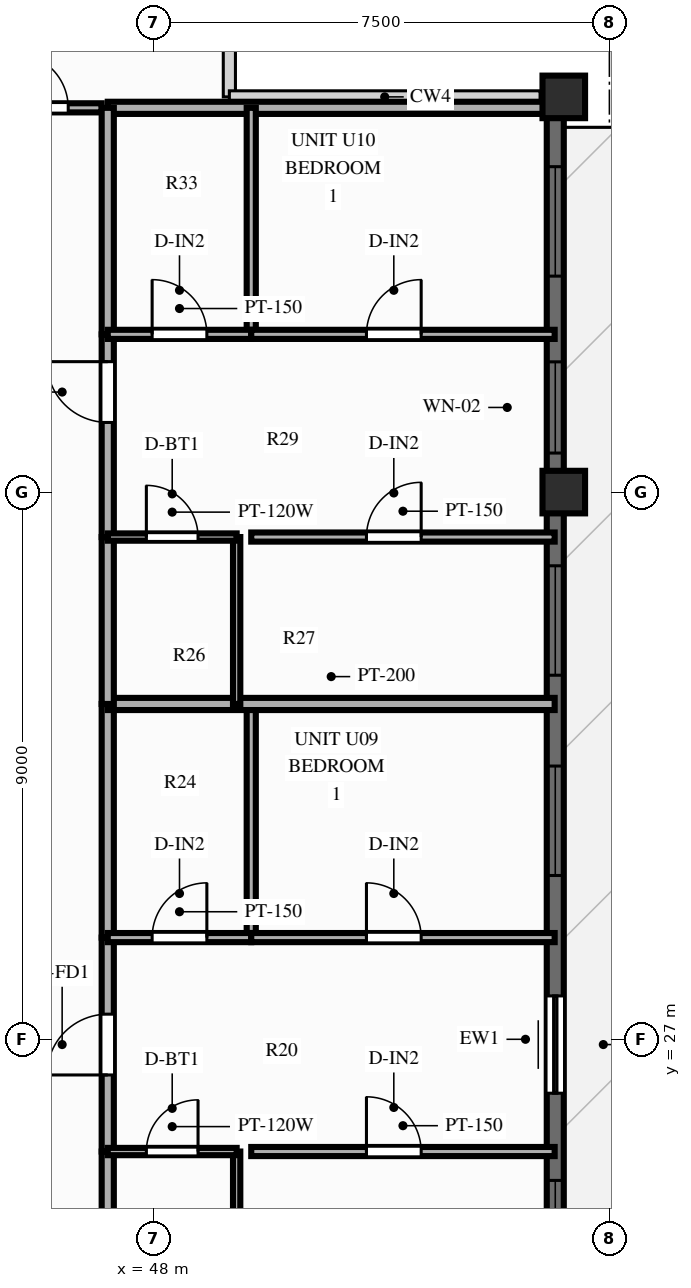
"""IFC4 building model, lengths in metres.
Left out: names, types, materials, properties, quantities, classifications, styles, units other than length and angle.
Written with IfcOpenShell. Run it as: python <this file> out.ifc"""

import sys

from ifc_helpers import new_model, si_unit, direction, frame, frame_2d, origin, origin_2d, place, context, subcontext, project, spatial, rectangle, extrude, source, transform, mapped, element, fill, save


model = new_model("IFC4")
c1 = context("Model", 3, precision=1e-05, world=origin(), true_north=direction((0.0, 1.0)))
c2 = subcontext(c1, "Body", "Model", "MODEL_VIEW")
j1 = project(units=[si_unit("LENGTHUNIT", "METRE"), si_unit("PLANEANGLEUNIT", "RADIAN")], contexts=[c1])
p1 = place(None, origin())
s1 = spatial("IfcSite", under=j1, at=p1, CompositionType="ELEMENT")
p2 = place(p1, origin())
s2 = spatial("IfcBuilding", under=s1, at=p2, CompositionType="ELEMENT")
p3 = place(p2, frame((0.0, 0.0, 226.2)))
s3 = spatial("IfcBuildingStorey", under=s2, at=p3, CompositionType="ELEMENT", Elevation=226.2)
m1 = source(origin(), c2, "Body", "SweptSolid", [
    extrude(rectangle(XDim=0.7, YDim=0.7, at=origin_2d()), origin(), (0.0, 0.0, 1.0), 3.9),
])
for number, where, z_axis, x_axis in (
    (1, (54.75, 36.0, 0.0), (0.0, 0.0, 1.0), (1.0, 0.0, 0.0)),
    (2, (54.75, 42.5, 0.0), (0.0, 0.0, 1.0), (1.0, 0.0, 0.0)),
):
    element("IfcColumn", number, at=place(p3, frame(where, z_axis=z_axis, x_axis=x_axis)), inside=s3, PredefinedType="COLUMN", context=c2, shape_type="MappedRepresentation", body=[
        mapped(m1, transform((0.0, 0.0, 0.0), scale=1.0)),
    ])
p4 = place(p3, frame((54.61, 11.5, 0.0), z_axis=(0.0, 0.0, 1.0), x_axis=(0.0, 1.0, 0.0)))
e3 = element("IfcWall", 3, at=p4, inside=s3, PredefinedType="SOLIDWALL", context=c2, shape_type="SweptSolid", body=[
    extrude(rectangle(XDim=31.0, YDim=0.28, at=frame_2d((15.5, 0.0))), origin(), (0.0, 0.0, 1.0), 2.79),
])
p5 = place(p4, frame((0.66, 0.0, 0.85)))
e4 = element("IfcOpeningElement", 4, at=p5, cuts=e3, PredefinedType="OPENING", context=c2, shape_type="SweptSolid", body=[
    extrude(rectangle(XDim=1.8, YDim=1.65, at=frame_2d((0.9, 0.825))), frame((0.0, 0.152, 0.0), z_axis=(0.0, -1.0, 0.0), x_axis=(1.0, 0.0, 0.0)), (0.0, 0.0, 1.0), 0.304),
])
p6 = place(p4, frame((3.72, 0.0, 0.85)))
e5 = element("IfcOpeningElement", 5, at=p6, cuts=e3, PredefinedType="OPENING", context=c2, shape_type="SweptSolid", body=[
    extrude(rectangle(XDim=1.8, YDim=1.65, at=frame_2d((0.9, 0.825))), frame((0.0, 0.152, 0.0), z_axis=(0.0, -1.0, 0.0), x_axis=(1.0, 0.0, 0.0)), (0.0, 0.0, 1.0), 0.304),
])
p7 = place(p4, frame((7.942, 0.0, 0.85)))
e6 = element("IfcOpeningElement", 6, at=p7, cuts=e3, PredefinedType="OPENING", context=c2, shape_type="SweptSolid", body=[
    extrude(rectangle(XDim=1.8, YDim=1.65, at=frame_2d((0.9, 0.825))), frame((0.0, 0.152, 0.0), z_axis=(0.0, -1.0, 0.0), x_axis=(1.0, 0.0, 0.0)), (0.0, 0.0, 1.0), 0.304),
])
p8 = place(p4, frame((11.379, 0.0, 0.85)))
e7 = element("IfcOpeningElement", 7, at=p8, cuts=e3, PredefinedType="OPENING", context=c2, shape_type="SweptSolid", body=[
    extrude(rectangle(XDim=1.8, YDim=1.65, at=frame_2d((0.9, 0.825))), frame((0.0, 0.152, 0.0), z_axis=(0.0, -1.0, 0.0), x_axis=(1.0, 0.0, 0.0)), (0.0, 0.0, 1.0), 0.304),
])
p9 = place(p4, frame((16.213, 0.0, 0.0), z_axis=(0.0, 0.0, 1.0), x_axis=(-1.0, 0.0, 0.0)))
e8 = element("IfcOpeningElement", 8, at=p9, cuts=e3, PredefinedType="OPENING", context=c2, shape_type="SweptSolid", body=[
    extrude(rectangle(XDim=1.6, YDim=2.15, at=frame_2d((0.8, 1.075))), frame((0.0, 0.152, 0.0), z_axis=(0.0, -1.0, 0.0), x_axis=(1.0, 0.0, 0.0)), (0.0, 0.0, 1.0), 0.304),
])
p10 = place(p4, frame((18.194, 0.0, 0.85)))
e9 = element("IfcOpeningElement", 9, at=p10, cuts=e3, PredefinedType="OPENING", context=c2, shape_type="SweptSolid", body=[
    extrude(rectangle(XDim=1.8, YDim=1.65, at=frame_2d((0.9, 0.825))), frame((0.0, 0.152, 0.0), z_axis=(0.0, -1.0, 0.0), x_axis=(1.0, 0.0, 0.0)), (0.0, 0.0, 1.0), 0.304),
])
p11 = place(p4, frame((21.488, 0.0, 0.85)))
e10 = element("IfcOpeningElement", 10, at=p11, cuts=e3, PredefinedType="OPENING", context=c2, shape_type="SweptSolid", body=[
    extrude(rectangle(XDim=1.8, YDim=1.65, at=frame_2d((0.9, 0.825))), frame((0.0, 0.152, 0.0), z_axis=(0.0, -1.0, 0.0), x_axis=(1.0, 0.0, 0.0)), (0.0, 0.0, 1.0), 0.304),
])
p12 = place(p4, frame((25.142, 0.0, 0.85)))
e11 = element("IfcOpeningElement", 11, at=p12, cuts=e3, PredefinedType="OPENING", context=c2, shape_type="SweptSolid", body=[
    extrude(rectangle(XDim=1.5, YDim=1.65, at=frame_2d((0.75, 0.825))), frame((0.0, 0.152, 0.0), z_axis=(0.0, -1.0, 0.0), x_axis=(1.0, 0.0, 0.0)), (0.0, 0.0, 1.0), 0.304),
])
p13 = place(p4, frame((28.052, 0.0, 0.85)))
e12 = element("IfcOpeningElement", 12, at=p13, cuts=e3, PredefinedType="OPENING", context=c2, shape_type="SweptSolid", body=[
    extrude(rectangle(XDim=1.8, YDim=1.65, at=frame_2d((0.9, 0.825))), frame((0.0, 0.152, 0.0), z_axis=(0.0, -1.0, 0.0), x_axis=(1.0, 0.0, 0.0)), (0.0, 0.0, 1.0), 0.304),
])
p14 = place(p3, frame((44.82, 42.32, 0.0), z_axis=(0.0, 0.0, 1.0), x_axis=(1.0, 0.0, 0.0)))
e13 = element("IfcWall", 13, at=p14, inside=s3, PredefinedType="PARTITIONING", context=c2, shape_type="SweptSolid", body=[
    extrude(rectangle(XDim=2.33, YDim=0.15, at=frame_2d((1.165, 0.0))), origin(), (0.0, 0.0, 1.0), 3.69),
])
p15 = place(p14, frame((0.88, 0.0, 0.0)))
e14 = element("IfcOpeningElement", 14, at=p15, cuts=e13, PredefinedType="OPENING", context=c2, shape_type="SweptSolid", body=[
    extrude(rectangle(XDim=0.9, YDim=2.1, at=frame_2d((0.45, 1.05))), frame((0.0, 0.087, 0.0), z_axis=(0.0, -1.0, 0.0), x_axis=(1.0, 0.0, 0.0)), (0.0, 0.0, 1.0), 0.174),
])
p16 = place(p3, frame((47.25, 42.32, 0.0), z_axis=(0.0, 0.0, 1.0), x_axis=(1.0, 0.0, 0.0)))
e15 = element("IfcWall", 15, at=p16, inside=s3, PredefinedType="PARTITIONING", context=c2, shape_type="SweptSolid", body=[
    extrude(rectangle(XDim=7.35, YDim=0.2, at=frame_2d((3.675, 0.0))), origin(), (0.0, 0.0, 1.0), 3.69),
])
p17 = place(p3, frame((47.25, 22.404, 0.0), z_axis=(0.0, 0.0, 1.0), x_axis=(0.0, 1.0, 0.0)))
e16 = element("IfcWall", 16, at=p17, inside=s3, PredefinedType="PARTITIONING", context=c2, shape_type="SweptSolid", body=[
    extrude(rectangle(XDim=2.75, YDim=0.2, at=frame_2d((1.375, 0.0))), origin(), (0.0, 0.0, 1.0), 3.69),
])
p18 = place(p3, frame((47.25, 25.154, 0.0), z_axis=(0.0, 0.0, 1.0), x_axis=(0.0, 1.0, 0.0)))
e17 = element("IfcWall", 17, at=p18, inside=s3, PredefinedType="PARTITIONING", context=c2, shape_type="SweptSolid", body=[
    extrude(rectangle(XDim=3.519, YDim=0.2, at=frame_2d((1.759, 0.0))), origin(), (0.0, 0.0, 1.0), 3.69),
])
p19 = place(p18, frame((1.26, 0.0, 0.0)))
e18 = element("IfcOpeningElement", 18, at=p19, cuts=e17, PredefinedType="OPENING", context=c2, shape_type="SweptSolid", body=[
    extrude(rectangle(XDim=1.0, YDim=2.15, at=frame_2d((0.5, 1.075))), frame((0.0, 0.112, 0.0), z_axis=(0.0, -1.0, 0.0), x_axis=(1.0, 0.0, 0.0)), (0.0, 0.0, 1.0), 0.224),
])
p20 = place(p3, frame((47.25, 28.673, 0.0), z_axis=(0.0, 0.0, 1.0), x_axis=(0.0, 1.0, 0.0)))
e19 = element("IfcWall", 19, at=p20, inside=s3, PredefinedType="PARTITIONING", context=c2, shape_type="SweptSolid", body=[
    extrude(rectangle(XDim=3.842, YDim=0.2, at=frame_2d((1.921, 0.0))), origin(), (0.0, 0.0, 1.0), 3.69),
])
p21 = place(p3, frame((49.37, 22.404, 0.0), z_axis=(0.0, 0.0, 1.0), x_axis=(0.0, 1.0, 0.0)))
e20 = element("IfcWall", 20, at=p21, inside=s3, PredefinedType="PARTITIONING", context=c2, shape_type="SweptSolid", body=[
    extrude(rectangle(XDim=2.75, YDim=0.12, at=frame_2d((1.375, 0.0))), origin(), (0.0, 0.0, 1.0), 3.39),
])
p22 = place(p3, frame((49.61, 28.673, 0.0), z_axis=(0.0, 0.0, 1.0), x_axis=(0.0, 1.0, 0.0)))
e21 = element("IfcWall", 21, at=p22, inside=s3, PredefinedType="PARTITIONING", context=c2, shape_type="SweptSolid", body=[
    extrude(rectangle(XDim=3.842, YDim=0.15, at=frame_2d((1.921, 0.0))), origin(), (0.0, 0.0, 1.0), 3.39),
])
p23 = place(p3, frame((47.25, 25.154, 0.0), z_axis=(0.0, 0.0, 1.0), x_axis=(1.0, 0.0, 0.0)))
e22 = element("IfcWall", 22, at=p23, inside=s3, PredefinedType="PARTITIONING", context=c2, shape_type="SweptSolid", body=[
    extrude(rectangle(XDim=2.12, YDim=0.12, at=frame_2d((1.06, 0.0))), origin(), (0.0, 0.0, 1.0), 3.69),
])
p24 = place(p23, frame((0.635, 0.0, 0.0)))
e23 = element("IfcOpeningElement", 23, at=p24, cuts=e22, PredefinedType="OPENING", context=c2, shape_type="SweptSolid", body=[
    extrude(rectangle(XDim=0.85, YDim=2.05, at=frame_2d((0.425, 1.025))), frame((0.0, 0.072, 0.0), z_axis=(0.0, -1.0, 0.0), x_axis=(1.0, 0.0, 0.0)), (0.0, 0.0, 1.0), 0.144),
])
p25 = place(p3, frame((49.61, 25.154, 0.0), z_axis=(0.0, 0.0, 1.0), x_axis=(1.0, 0.0, 0.0)))
e24 = element("IfcWall", 24, at=p25, inside=s3, PredefinedType="PARTITIONING", context=c2, shape_type="SweptSolid", body=[
    extrude(rectangle(XDim=4.99, YDim=0.15, at=frame_2d((2.495, 0.0))), origin(), (0.0, 0.0, 1.0), 3.69),
])
p26 = place(p25, frame((1.895, 0.0, 0.0)))
e25 = element("IfcOpeningElement", 25, at=p26, cuts=e24, PredefinedType="OPENING", context=c2, shape_type="SweptSolid", body=[
    extrude(rectangle(XDim=0.9, YDim=2.1, at=frame_2d((0.45, 1.05))), frame((0.0, 0.087, 0.0), z_axis=(0.0, -1.0, 0.0), x_axis=(1.0, 0.0, 0.0)), (0.0, 0.0, 1.0), 0.174),
])
p27 = place(p3, frame((47.25, 28.673, 0.0), z_axis=(0.0, 0.0, 1.0), x_axis=(1.0, 0.0, 0.0)))
e26 = element("IfcWall", 26, at=p27, inside=s3, PredefinedType="PARTITIONING", context=c2, shape_type="SweptSolid", body=[
    extrude(rectangle(XDim=2.36, YDim=0.15, at=frame_2d((1.18, 0.0))), origin(), (0.0, 0.0, 1.0), 3.69),
])
p28 = place(p27, frame((0.73, 0.0, 0.0)))
e27 = element("IfcOpeningElement", 27, at=p28, cuts=e26, PredefinedType="OPENING", context=c2, shape_type="SweptSolid", body=[
    extrude(rectangle(XDim=0.9, YDim=2.1, at=frame_2d((0.45, 1.05))), frame((0.0, 0.087, 0.0), z_axis=(0.0, -1.0, 0.0), x_axis=(1.0, 0.0, 0.0)), (0.0, 0.0, 1.0), 0.174),
])
p29 = place(p3, frame((49.61, 28.673, 0.0), z_axis=(0.0, 0.0, 1.0), x_axis=(1.0, 0.0, 0.0)))
e28 = element("IfcWall", 28, at=p29, inside=s3, PredefinedType="PARTITIONING", context=c2, shape_type="SweptSolid", body=[
    extrude(rectangle(XDim=4.99, YDim=0.15, at=frame_2d((2.495, 0.0))), origin(), (0.0, 0.0, 1.0), 3.69),
])
p30 = place(p29, frame((1.895, 0.0, 0.0)))
e29 = element("IfcOpeningElement", 29, at=p30, cuts=e28, PredefinedType="OPENING", context=c2, shape_type="SweptSolid", body=[
    extrude(rectangle(XDim=0.9, YDim=2.1, at=frame_2d((0.45, 1.05))), frame((0.0, 0.087, 0.0), z_axis=(0.0, -1.0, 0.0), x_axis=(1.0, 0.0, 0.0)), (0.0, 0.0, 1.0), 0.174),
])
p31 = place(p3, frame((47.25, 32.515, 0.0), z_axis=(0.0, 0.0, 1.0), x_axis=(1.0, 0.0, 0.0)))
e30 = element("IfcWall", 30, at=p31, inside=s3, PredefinedType="PARTITIONING", context=c2, shape_type="SweptSolid", body=[
    extrude(rectangle(XDim=7.35, YDim=0.2, at=frame_2d((3.675, 0.0))), origin(), (0.0, 0.0, 1.0), 3.29),
])
p32 = place(p3, frame((47.25, 32.515, 0.0), z_axis=(0.0, 0.0, 1.0), x_axis=(0.0, 1.0, 0.0)))
e31 = element("IfcWall", 31, at=p32, inside=s3, PredefinedType="PARTITIONING", context=c2, shape_type="SweptSolid", body=[
    extrude(rectangle(XDim=2.745, YDim=0.2, at=frame_2d((1.373, 0.0))), origin(), (0.0, 0.0, 1.0), 3.69),
])
p33 = place(p3, frame((47.25, 35.26, 0.0), z_axis=(0.0, 0.0, 1.0), x_axis=(0.0, 1.0, 0.0)))
e32 = element("IfcWall", 32, at=p33, inside=s3, PredefinedType="PARTITIONING", context=c2, shape_type="SweptSolid", body=[
    extrude(rectangle(XDim=3.334, YDim=0.2, at=frame_2d((1.667, 0.0))), origin(), (0.0, 0.0, 1.0), 3.69),
])
p34 = place(p33, frame((1.885, 0.0, 0.0)))
e33 = element("IfcOpeningElement", 33, at=p34, cuts=e32, PredefinedType="OPENING", context=c2, shape_type="SweptSolid", body=[
    extrude(rectangle(XDim=1.0, YDim=2.15, at=frame_2d((0.5, 1.075))), frame((0.0, 0.112, 0.0), z_axis=(0.0, -1.0, 0.0), x_axis=(1.0, 0.0, 0.0)), (0.0, 0.0, 1.0), 0.224),
])
p35 = place(p3, frame((47.25, 38.594, 0.0), z_axis=(0.0, 0.0, 1.0), x_axis=(0.0, 1.0, 0.0)))
e34 = element("IfcWall", 34, at=p35, inside=s3, PredefinedType="PARTITIONING", context=c2, shape_type="SweptSolid", body=[
    extrude(rectangle(XDim=3.726, YDim=0.2, at=frame_2d((1.863, 0.0))), origin(), (0.0, 0.0, 1.0), 3.69),
])
p36 = place(p3, frame((49.37, 32.515, 0.0), z_axis=(0.0, 0.0, 1.0), x_axis=(0.0, 1.0, 0.0)))
e35 = element("IfcWall", 35, at=p36, inside=s3, PredefinedType="PARTITIONING", context=c2, shape_type="SweptSolid", body=[
    extrude(rectangle(XDim=2.745, YDim=0.12, at=frame_2d((1.373, 0.0))), origin(), (0.0, 0.0, 1.0), 3.39),
])
p37 = place(p3, frame((49.61, 38.594, 0.0), z_axis=(0.0, 0.0, 1.0), x_axis=(0.0, 1.0, 0.0)))
e36 = element("IfcWall", 36, at=p37, inside=s3, PredefinedType="PARTITIONING", context=c2, shape_type="SweptSolid", body=[
    extrude(rectangle(XDim=3.726, YDim=0.15, at=frame_2d((1.863, 0.0))), origin(), (0.0, 0.0, 1.0), 3.69),
])
p38 = place(p3, frame((47.25, 35.26, 0.0), z_axis=(0.0, 0.0, 1.0), x_axis=(1.0, 0.0, 0.0)))
e37 = element("IfcWall", 37, at=p38, inside=s3, PredefinedType="PARTITIONING", context=c2, shape_type="SweptSolid", body=[
    extrude(rectangle(XDim=2.12, YDim=0.12, at=frame_2d((1.06, 0.0))), origin(), (0.0, 0.0, 1.0), 3.69),
])
p39 = place(p38, frame((0.635, 0.0, 0.0)))
e38 = element("IfcOpeningElement", 38, at=p39, cuts=e37, PredefinedType="OPENING", context=c2, shape_type="SweptSolid", body=[
    extrude(rectangle(XDim=0.85, YDim=2.05, at=frame_2d((0.425, 1.025))), frame((0.0, 0.072, 0.0), z_axis=(0.0, -1.0, 0.0), x_axis=(1.0, 0.0, 0.0)), (0.0, 0.0, 1.0), 0.144),
])
p40 = place(p3, frame((49.61, 35.26, 0.0), z_axis=(0.0, 0.0, 1.0), x_axis=(1.0, 0.0, 0.0)))
e39 = element("IfcWall", 39, at=p40, inside=s3, PredefinedType="PARTITIONING", context=c2, shape_type="SweptSolid", body=[
    extrude(rectangle(XDim=4.99, YDim=0.15, at=frame_2d((2.495, 0.0))), origin(), (0.0, 0.0, 1.0), 3.69),
])
p41 = place(p40, frame((1.895, 0.0, 0.0)))
e40 = element("IfcOpeningElement", 40, at=p41, cuts=e39, PredefinedType="OPENING", context=c2, shape_type="SweptSolid", body=[
    extrude(rectangle(XDim=0.9, YDim=2.1, at=frame_2d((0.45, 1.05))), frame((0.0, 0.087, 0.0), z_axis=(0.0, -1.0, 0.0), x_axis=(1.0, 0.0, 0.0)), (0.0, 0.0, 1.0), 0.174),
])
p42 = place(p3, frame((47.25, 38.594, 0.0), z_axis=(0.0, 0.0, 1.0), x_axis=(1.0, 0.0, 0.0)))
e41 = element("IfcWall", 41, at=p42, inside=s3, PredefinedType="PARTITIONING", context=c2, shape_type="SweptSolid", body=[
    extrude(rectangle(XDim=2.36, YDim=0.15, at=frame_2d((1.18, 0.0))), origin(), (0.0, 0.0, 1.0), 3.69),
])
p43 = place(p42, frame((0.73, 0.0, 0.0)))
e42 = element("IfcOpeningElement", 42, at=p43, cuts=e41, PredefinedType="OPENING", context=c2, shape_type="SweptSolid", body=[
    extrude(rectangle(XDim=0.9, YDim=2.1, at=frame_2d((0.45, 1.05))), frame((0.0, 0.087, 0.0), z_axis=(0.0, -1.0, 0.0), x_axis=(1.0, 0.0, 0.0)), (0.0, 0.0, 1.0), 0.174),
])
p44 = place(p3, frame((49.61, 38.594, 0.0), z_axis=(0.0, 0.0, 1.0), x_axis=(1.0, 0.0, 0.0)))
e43 = element("IfcWall", 43, at=p44, inside=s3, PredefinedType="PARTITIONING", context=c2, shape_type="SweptSolid", body=[
    extrude(rectangle(XDim=4.99, YDim=0.15, at=frame_2d((2.495, 0.0))), origin(), (0.0, 0.0, 1.0), 3.69),
])
p45 = place(p44, frame((1.895, 0.0, 0.0)))
e44 = element("IfcOpeningElement", 44, at=p45, cuts=e43, PredefinedType="OPENING", context=c2, shape_type="SweptSolid", body=[
    extrude(rectangle(XDim=0.9, YDim=2.1, at=frame_2d((0.45, 1.05))), frame((0.0, 0.087, 0.0), z_axis=(0.0, -1.0, 0.0), x_axis=(1.0, 0.0, 0.0)), (0.0, 0.0, 1.0), 0.174),
])
m2 = source(origin(), c2, "Body", "SweptSolid", [
    extrude(rectangle(XDim=1.8, YDim=1.65, at=frame_2d((0.9, 0.825))), frame((0.0, 0.03, 0.0), z_axis=(0.0, -1.0, 0.0), x_axis=(1.0, 0.0, 0.0)), (0.0, 0.0, 1.0), 0.06),
])
p46 = place(p8, origin())
e45 = element("IfcWindow", 45, at=p46, inside=s3, PartitioningType="SINGLE_PANEL", PredefinedType="WINDOW", context=c2, shape_type="MappedRepresentation", body=[
    mapped(m2, transform((0.0, 0.0, 0.0), scale=1.0)),
])
fill(e7, e45)
m3 = source(origin(), c2, "Body", "SweptSolid", [
    extrude(rectangle(XDim=1.6, YDim=2.15, at=frame_2d((0.8, 1.075))), frame((0.0, 0.025, 0.0), z_axis=(0.0, -1.0, 0.0), x_axis=(1.0, 0.0, 0.0)), (0.0, 0.0, 1.0), 0.05),
])
p47 = place(p9, origin())
e46 = element("IfcDoor", 46, at=p47, inside=s3, OperationType="SLIDING_TO_LEFT", PredefinedType="DOOR", context=c2, shape_type="MappedRepresentation", body=[
    mapped(m3, transform((0.0, 0.0, 0.0), scale=1.0)),
])
fill(e8, e46)
p48 = place(p10, origin())
e47 = element("IfcWindow", 47, at=p48, inside=s3, PartitioningType="SINGLE_PANEL", PredefinedType="WINDOW", context=c2, shape_type="MappedRepresentation", body=[
    mapped(m2, transform((0.0, 0.0, 0.0), scale=1.0)),
])
fill(e9, e47)
p49 = place(p11, origin())
e48 = element("IfcWindow", 48, at=p49, inside=s3, PartitioningType="SINGLE_PANEL", PredefinedType="WINDOW", context=c2, shape_type="MappedRepresentation", body=[
    mapped(m2, transform((0.0, 0.0, 0.0), scale=1.0)),
])
fill(e10, e48)
m4 = source(origin(), c2, "Body", "SweptSolid", [
    extrude(rectangle(XDim=1.5, YDim=1.65, at=frame_2d((0.75, 0.825))), frame((0.0, 0.03, 0.0), z_axis=(0.0, -1.0, 0.0), x_axis=(1.0, 0.0, 0.0)), (0.0, 0.0, 1.0), 0.06),
])
p50 = place(p12, origin())
e49 = element("IfcWindow", 49, at=p50, inside=s3, PartitioningType="SINGLE_PANEL", PredefinedType="WINDOW", context=c2, shape_type="MappedRepresentation", body=[
    mapped(m4, transform((0.0, 0.0, 0.0), scale=1.0)),
])
fill(e11, e49)
p51 = place(p13, origin())
e50 = element("IfcWindow", 50, at=p51, inside=s3, PartitioningType="SINGLE_PANEL", PredefinedType="WINDOW", context=c2, shape_type="MappedRepresentation", body=[
    mapped(m2, transform((0.0, 0.0, 0.0), scale=1.0)),
])
fill(e12, e50)
m5 = source(origin(), c2, "Body", "SweptSolid", [
    extrude(rectangle(XDim=0.9, YDim=2.1, at=frame_2d((0.45, 1.05))), frame((0.0, 0.025, 0.0), z_axis=(0.0, -1.0, 0.0), x_axis=(1.0, 0.0, 0.0)), (0.0, 0.0, 1.0), 0.05),
])
p52 = place(p15, origin())
e51 = element("IfcDoor", 51, at=p52, inside=s3, OperationType="SINGLE_SWING_LEFT", PredefinedType="DOOR", context=c2, shape_type="MappedRepresentation", body=[
    mapped(m5, transform((0.0, 0.0, 0.0), scale=1.0)),
])
fill(e14, e51)
m6 = source(origin(), c2, "Body", "SweptSolid", [
    extrude(rectangle(XDim=1.0, YDim=2.15, at=frame_2d((0.5, 1.075))), frame((0.0, 0.025, 0.0), z_axis=(0.0, -1.0, 0.0), x_axis=(1.0, 0.0, 0.0)), (0.0, 0.0, 1.0), 0.05),
])
p53 = place(p19, origin())
e52 = element("IfcDoor", 52, at=p53, inside=s3, OperationType="SINGLE_SWING_LEFT", PredefinedType="DOOR", context=c2, shape_type="MappedRepresentation", body=[
    mapped(m6, transform((0.0, 0.0, 0.0), scale=1.0)),
])
fill(e18, e52)
m7 = source(origin(), c2, "Body", "SweptSolid", [
    extrude(rectangle(XDim=0.85, YDim=2.05, at=frame_2d((0.425, 1.025))), frame((0.0, 0.025, 0.0), z_axis=(0.0, -1.0, 0.0), x_axis=(1.0, 0.0, 0.0)), (0.0, 0.0, 1.0), 0.05),
])
p54 = place(p24, origin())
e53 = element("IfcDoor", 53, at=p54, inside=s3, OperationType="SINGLE_SWING_RIGHT", PredefinedType="DOOR", context=c2, shape_type="MappedRepresentation", body=[
    mapped(m7, transform((0.0, 0.0, 0.0), scale=1.0)),
])
fill(e23, e53)
p55 = place(p26, origin())
e54 = element("IfcDoor", 54, at=p55, inside=s3, OperationType="SINGLE_SWING_LEFT", PredefinedType="DOOR", context=c2, shape_type="MappedRepresentation", body=[
    mapped(m5, transform((0.0, 0.0, 0.0), scale=1.0)),
])
fill(e25, e54)
p56 = place(p28, origin())
e55 = element("IfcDoor", 55, at=p56, inside=s3, OperationType="SINGLE_SWING_RIGHT", PredefinedType="DOOR", context=c2, shape_type="MappedRepresentation", body=[
    mapped(m5, transform((0.0, 0.0, 0.0), scale=1.0)),
])
fill(e27, e55)
p57 = place(p30, origin())
e56 = element("IfcDoor", 56, at=p57, inside=s3, OperationType="SINGLE_SWING_LEFT", PredefinedType="DOOR", context=c2, shape_type="MappedRepresentation", body=[
    mapped(m5, transform((0.0, 0.0, 0.0), scale=1.0)),
])
fill(e29, e56)
p58 = place(p34, origin())
e57 = element("IfcDoor", 57, at=p58, inside=s3, OperationType="SINGLE_SWING_RIGHT", PredefinedType="DOOR", context=c2, shape_type="MappedRepresentation", body=[
    mapped(m6, transform((0.0, 0.0, 0.0), scale=1.0)),
])
fill(e33, e57)
p59 = place(p39, origin())
e58 = element("IfcDoor", 58, at=p59, inside=s3, OperationType="SINGLE_SWING_LEFT", PredefinedType="DOOR", context=c2, shape_type="MappedRepresentation", body=[
    mapped(m7, transform((0.0, 0.0, 0.0), scale=1.0)),
])
fill(e38, e58)
p60 = place(p41, origin())
e59 = element("IfcDoor", 59, at=p60, inside=s3, OperationType="SINGLE_SWING_RIGHT", PredefinedType="DOOR", context=c2, shape_type="MappedRepresentation", body=[
    mapped(m5, transform((0.0, 0.0, 0.0), scale=1.0)),
])
fill(e40, e59)
p61 = place(p43, origin())
e60 = element("IfcDoor", 60, at=p61, inside=s3, OperationType="SINGLE_SWING_LEFT", PredefinedType="DOOR", context=c2, shape_type="MappedRepresentation", body=[
    mapped(m5, transform((0.0, 0.0, 0.0), scale=1.0)),
])
fill(e42, e60)
p62 = place(p45, origin())
e61 = element("IfcDoor", 61, at=p62, inside=s3, OperationType="SINGLE_SWING_RIGHT", PredefinedType="DOOR", context=c2, shape_type="MappedRepresentation", body=[
    mapped(m5, transform((0.0, 0.0, 0.0), scale=1.0)),
])
fill(e44, e61)
save(model, sys.argv[1])
